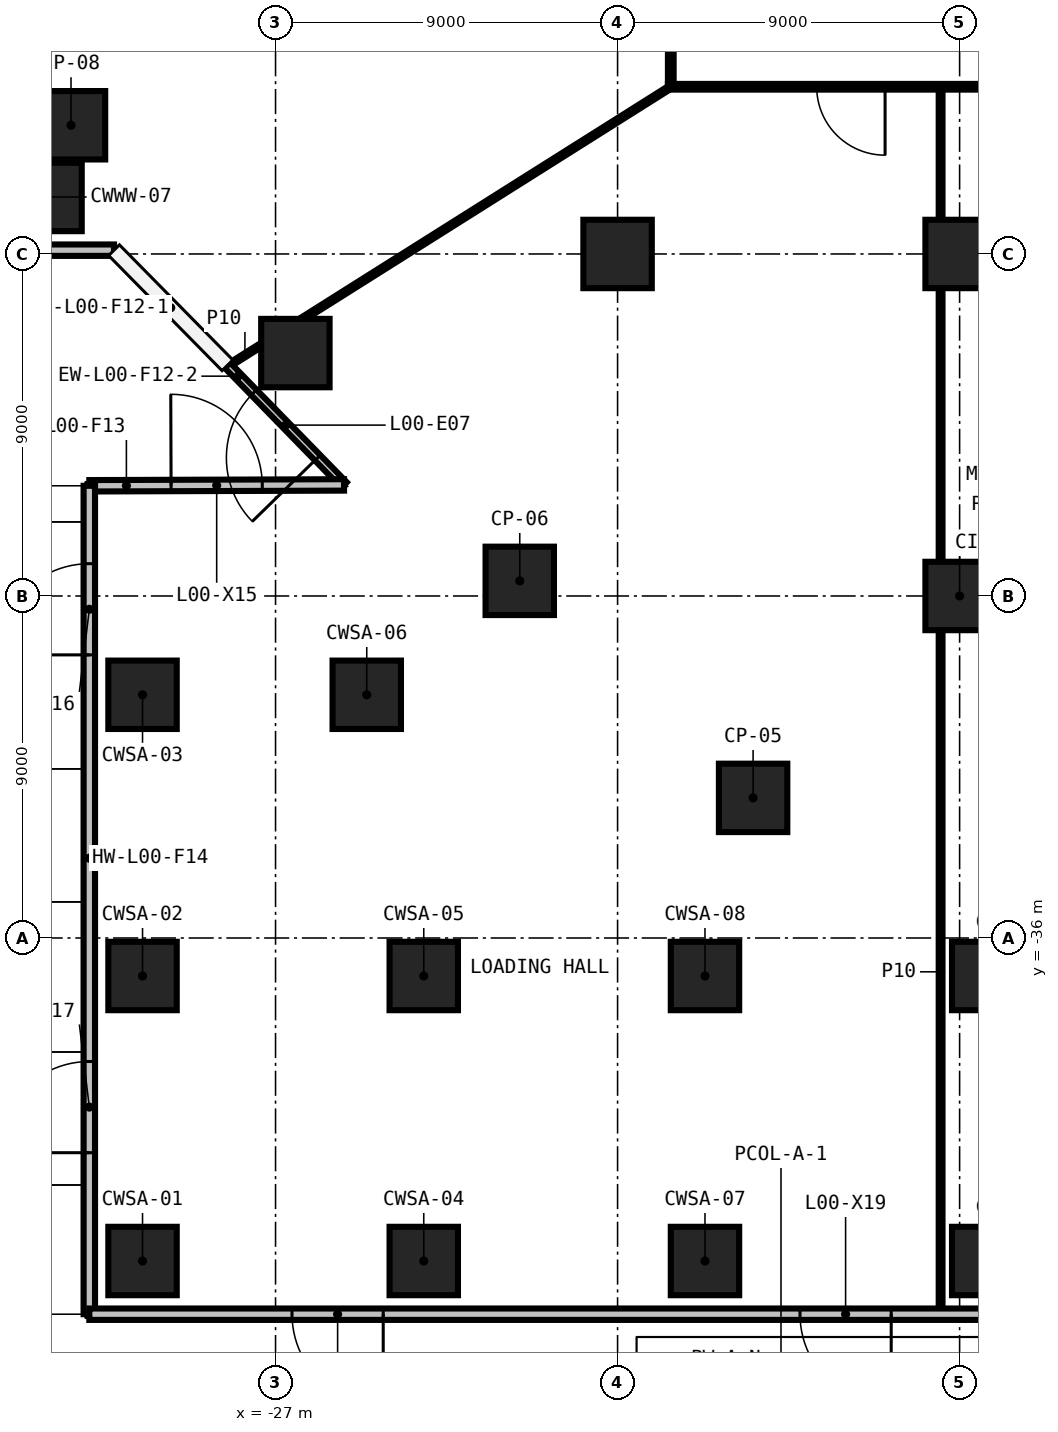
"""IFC4 building model, lengths in metres.
Left out: names, types, materials, properties, quantities, classifications, styles, units other than length and angle.
Written with IfcOpenShell. Run it as: python <this file> out.ifc"""

import sys

from ifc_helpers import new_model, si_unit, direction, frame, frame_2d, origin, origin_2d, place, context, subcontext, project, spatial, rectangle, extrude, element, fill, save


model = new_model("IFC4")
c1 = context("Model", 3, precision=1e-05, world=origin(), true_north=direction((0.0, 1.0)))
c2 = subcontext(c1, "Body", "Model", "MODEL_VIEW")
j1 = project(units=[si_unit("LENGTHUNIT", "METRE"), si_unit("PLANEANGLEUNIT", "RADIAN")], contexts=[c1])
p1 = place(None, origin())
s1 = spatial("IfcSite", under=j1, at=p1, CompositionType="ELEMENT")
p2 = place(p1, origin())
s2 = spatial("IfcBuilding", under=s1, at=p2, CompositionType="ELEMENT")
p3 = place(p2, origin())
s3 = spatial("IfcBuildingStorey", under=s2, at=p3, CompositionType="ELEMENT", Elevation=0.0)
for number, where, z_axis, x_axis in (
    (1, (-14.434, -32.313, 0.0), (0.0, 0.0, 1.0), (1.0, 0.0, 0.0)),
    (2, (-20.574, -26.602, 0.0), (0.0, 0.0, 1.0), (1.0, 0.0, 0.0)),
    (3, (-26.478, -20.608, 0.0), (0.0, 0.0, 1.0), (1.0, 0.0, 0.0)),
    (4, (-32.382, -14.613, 0.0), (0.0, 0.0, 1.0), (1.0, 0.0, 0.0)),
    (5, (-18.0, -18.0, 0.0), (0.0, 0.0, 1.0), (1.0, 0.0, 0.0)),
    (6, (-9.0, -27.0, 0.0), (0.0, 0.0, 1.0), (1.0, 0.0, 0.0)),
    (7, (-9.0, -18.0, 0.0), (0.0, 0.0, 1.0), (1.0, 0.0, 0.0)),
):
    element("IfcColumn", number, at=place(p3, frame(where, z_axis=z_axis, x_axis=x_axis)), inside=s3, PredefinedType="COLUMN", context=c2, shape_type="SweptSolid", body=[
        extrude(rectangle(XDim=1.8, YDim=1.8, at=origin_2d()), origin(), (0.0, 0.0, 1.0), 8.55),
    ])
p4 = place(p3, frame((-33.0, -16.5, 0.0), z_axis=(0.0, 0.0, 1.0), x_axis=(1.0, 0.0, 0.0)))
e8 = element("IfcColumn", 8, at=p4, inside=s3, PredefinedType="COLUMN", context=c2, shape_type="SweptSolid", body=[
    extrude(rectangle(XDim=1.8, YDim=1.8, at=origin_2d()), origin(), (0.0, 0.0, 1.0), 8.7),
])
for number, where, z_axis, x_axis in (
    (9, (-30.5, -44.5, 0.0), (0.0, 0.0, 1.0), (1.0, 0.0, 0.0)),
    (10, (-30.5, -37.0, 0.0), (0.0, 0.0, 1.0), (1.0, 0.0, 0.0)),
    (11, (-30.5, -29.6, 0.0), (0.0, 0.0, 1.0), (1.0, 0.0, 0.0)),
    (12, (-23.1, -44.5, 0.0), (0.0, 0.0, 1.0), (1.0, 0.0, 0.0)),
    (13, (-23.1, -37.0, 0.0), (0.0, 0.0, 1.0), (1.0, 0.0, 0.0)),
    (14, (-24.6, -29.6, 0.0), (0.0, 0.0, 1.0), (1.0, 0.0, 0.0)),
    (15, (-15.7, -44.5, 0.0), (0.0, 0.0, 1.0), (1.0, 0.0, 0.0)),
    (16, (-15.7, -37.0, 0.0), (0.0, 0.0, 1.0), (1.0, 0.0, 0.0)),
    (17, (-8.3, -44.5, 0.0), (0.0, 0.0, 1.0), (1.0, 0.0, 0.0)),
    (18, (-8.3, -37.0, 0.0), (0.0, 0.0, 1.0), (1.0, 0.0, 0.0)),
):
    element("IfcColumn", number, at=place(p3, frame(where, z_axis=z_axis, x_axis=x_axis)), inside=s3, PredefinedType="COLUMN", context=c2, shape_type="SweptSolid", body=[
        extrude(rectangle(XDim=1.8, YDim=1.8, at=origin_2d()), origin(), (0.0, 0.0, 1.0), 8.55),
    ])
p5 = place(p3, frame((16.675, -13.6, 0.0), z_axis=(0.0, 0.0, 1.0), x_axis=(-1.0, 0.0, 0.0)))
e19 = element("IfcWall", 19, at=p5, inside=s3, PredefinedType="PARTITIONING", context=c2, shape_type="SweptSolid", body=[
    extrude(rectangle(XDim=33.35, YDim=0.15, at=frame_2d((16.675, 0.0))), origin(), (0.0, 0.0, 1.0), 8.55),
])
p6 = place(p5, frame((27.636, 0.0, 0.0)))
e20 = element("IfcOpeningElement", 20, at=p6, cuts=e19, PredefinedType="OPENING", context=c2, shape_type="SweptSolid", body=[
    extrude(rectangle(XDim=1.8, YDim=2.4, at=frame_2d((0.9, 1.2))), frame((0.0, 0.085, 0.0), z_axis=(0.0, -1.0, 0.0), x_axis=(1.0, 0.0, 0.0)), (0.0, 0.0, 1.0), 0.17),
])
p7 = place(p5, frame((23.492, 0.0, 0.0)))
e21 = element("IfcOpeningElement", 21, at=p7, cuts=e19, PredefinedType="OPENING", context=c2, shape_type="SweptSolid", body=[
    extrude(rectangle(XDim=1.2, YDim=2.1, at=frame_2d((0.6, 1.05))), frame((0.0, 0.085, 0.0), z_axis=(0.0, -1.0, 0.0), x_axis=(1.0, 0.0, 0.0)), (0.0, 0.0, 1.0), 0.17),
])
p8 = place(p5, frame((17.167, 0.0, 0.0)))
e22 = element("IfcOpeningElement", 22, at=p8, cuts=e19, PredefinedType="OPENING", context=c2, shape_type="SweptSolid", body=[
    extrude(rectangle(XDim=1.2, YDim=2.1, at=frame_2d((0.6, 1.05))), frame((0.0, 0.085, 0.0), z_axis=(0.0, -1.0, 0.0), x_axis=(1.0, 0.0, 0.0)), (0.0, 0.0, 1.0), 0.17),
])
p9 = place(p5, frame((1.764, 0.0, 0.0)))
e23 = element("IfcOpeningElement", 23, at=p9, cuts=e19, PredefinedType="OPENING", context=c2, shape_type="SweptSolid", body=[
    extrude(rectangle(XDim=1.2, YDim=2.1, at=frame_2d((0.6, 1.05))), frame((0.0, 0.085, 0.0), z_axis=(0.0, -1.0, 0.0), x_axis=(1.0, 0.0, 0.0)), (0.0, 0.0, 1.0), 0.17),
])
p10 = place(p5, frame((10.3, 0.0, 0.0)))
e24 = element("IfcOpeningElement", 24, at=p10, cuts=e19, PredefinedType="OPENING", context=c2, shape_type="SweptSolid", body=[
    extrude(rectangle(XDim=1.6, YDim=2.1, at=frame_2d((0.8, 1.05))), frame((0.0, 0.085, 0.0), z_axis=(0.0, -1.0, 0.0), x_axis=(1.0, 0.0, 0.0)), (0.0, 0.0, 1.0), 0.17),
])
p11 = place(p3, frame((-28.233, -20.934, 0.0), z_axis=(0.0, 0.0, 1.0), x_axis=(0.845930337859, 0.533293412195, 0.0)))
e25 = element("IfcWall", 25, at=p11, inside=s3, PredefinedType="PARTITIONING", context=c2, shape_type="SweptSolid", body=[
    extrude(rectangle(XDim=1.011, YDim=0.1, at=frame_2d((0.506, 0.0))), origin(), (0.0, 0.0, 1.0), 8.55),
])
p12 = place(p3, frame((-26.289, -19.708, 0.0), z_axis=(0.0, 0.0, 1.0), x_axis=(0.845914104745, 0.53331916091, 0.0)))
e26 = element("IfcWall", 26, at=p12, inside=s3, PredefinedType="PARTITIONING", context=c2, shape_type="SweptSolid", body=[
    extrude(rectangle(XDim=11.454, YDim=0.1, at=frame_2d((5.727, 0.0))), origin(), (0.0, 0.0, 1.0), 8.55),
])
p13 = place(p3, frame((-9.5, -45.88, 0.0), z_axis=(0.0, 0.0, 1.0), x_axis=(0.0, 1.0, 0.0)))
e27 = element("IfcWall", 27, at=p13, inside=s3, PredefinedType="PARTITIONING", context=c2, shape_type="SweptSolid", body=[
    extrude(rectangle(XDim=17.98, YDim=0.1, at=frame_2d((8.99, 0.0))), origin(), (0.0, 0.0, 1.0), 8.55),
])
p14 = place(p3, frame((-9.5, -26.1, 0.0), z_axis=(0.0, 0.0, 1.0), x_axis=(0.0, 1.0, 0.0)))
e28 = element("IfcWall", 28, at=p14, inside=s3, PredefinedType="PARTITIONING", context=c2, shape_type="SweptSolid", body=[
    extrude(rectangle(XDim=7.2, YDim=0.1, at=frame_2d((3.6, 0.0))), origin(), (0.0, 0.0, 1.0), 8.55),
])
p15 = place(p3, frame((-9.5, -17.1, 0.0), z_axis=(0.0, 0.0, 1.0), x_axis=(0.0, 1.0, 0.0)))
e29 = element("IfcWall", 29, at=p15, inside=s3, PredefinedType="PARTITIONING", context=c2, shape_type="SweptSolid", body=[
    extrude(rectangle(XDim=3.425, YDim=0.1, at=frame_2d((1.712, 0.0))), origin(), (0.0, 0.0, 1.0), 8.55),
])
p16 = place(p3, frame((-16.6, -13.525, 0.0), z_axis=(0.0, 0.0, 1.0), x_axis=(0.0, 1.0, 0.0)))
e30 = element("IfcWall", 30, at=p16, inside=s3, PredefinedType="PARTITIONING", context=c2, shape_type="SweptSolid", body=[
    extrude(rectangle(XDim=27.05, YDim=0.15, at=frame_2d((13.525, 0.0))), origin(), (0.0, 0.0, 1.0), 8.55),
])
p17 = place(p16, frame((17.467, 0.0, 0.0)))
e31 = element("IfcOpeningElement", 31, at=p17, cuts=e30, PredefinedType="OPENING", context=c2, shape_type="SweptSolid", body=[
    extrude(rectangle(XDim=1.2, YDim=2.1, at=frame_2d((0.6, 1.05))), frame((0.0, 0.085, 0.0), z_axis=(0.0, -1.0, 0.0), x_axis=(1.0, 0.0, 0.0)), (0.0, 0.0, 1.0), 0.17),
])
p18 = place(p3, frame((-31.25, -17.9, 0.0), z_axis=(0.0, 0.0, 1.0), x_axis=(-1.0, 0.0, 0.0)))
e32 = element("IfcWall", 32, at=p18, inside=s3, PredefinedType="SOLIDWALL", context=c2, shape_type="SweptSolid", body=[
    extrude(rectangle(XDim=26.65, YDim=0.3, at=frame_2d((13.325, 0.0))), origin(), (0.0, 0.0, 1.0), 8.55),
])
p19 = place(p18, frame((18.788, 0.0, 0.0)))
e33 = element("IfcOpeningElement", 33, at=p19, cuts=e32, PredefinedType="OPENING", context=c2, shape_type="SweptSolid", body=[
    extrude(rectangle(XDim=2.4, YDim=2.4, at=frame_2d((1.2, 1.2))), frame((0.0, 0.16, 0.0), z_axis=(0.0, -1.0, 0.0), x_axis=(1.0, 0.0, 0.0)), (0.0, 0.0, 1.0), 0.32),
])
p20 = place(p18, frame((3.762, 0.0, 0.0)))
e34 = element("IfcOpeningElement", 34, at=p20, cuts=e32, PredefinedType="OPENING", context=c2, shape_type="SweptSolid", body=[
    extrude(rectangle(XDim=2.4, YDim=2.4, at=frame_2d((1.2, 1.2))), frame((0.0, 0.16, 0.0), z_axis=(0.0, -1.0, 0.0), x_axis=(1.0, 0.0, 0.0)), (0.0, 0.0, 1.0), 0.32),
])
p21 = place(p3, frame((-25.198, -24.077, 0.0), z_axis=(0.0, 0.0, 1.0), x_axis=(-0.698022531425, 0.716075796005, 0.0)))
e35 = element("IfcWall", 35, at=p21, inside=s3, PredefinedType="SOLIDWALL", context=c2, shape_type="SweptSolid", body=[
    extrude(rectangle(XDim=4.395, YDim=0.2, at=frame_2d((2.198, 0.0))), origin(), (0.0, 0.0, 1.0), 8.55),
])
p22 = place(p21, frame((0.998, 0.0, 0.0)))
e36 = element("IfcOpeningElement", 36, at=p22, cuts=e35, PredefinedType="OPENING", context=c2, shape_type="SweptSolid", body=[
    extrude(rectangle(XDim=2.4, YDim=2.4, at=frame_2d((1.2, 1.2))), frame((0.0, 0.11, 0.0), z_axis=(0.0, -1.0, 0.0), x_axis=(1.0, 0.0, 0.0)), (0.0, 0.0, 1.0), 0.22),
])
p23 = place(p3, frame((-31.9, -24.1, 0.0), z_axis=(0.0, 0.0, 1.0), x_axis=(0.999994137621, 0.003424138458, 0.0)))
e37 = element("IfcWall", 37, at=p23, inside=s3, PredefinedType="SOLIDWALL", context=c2, shape_type="SweptSolid", body=[
    extrude(rectangle(XDim=6.702, YDim=0.3, at=frame_2d((3.351, 0.0))), origin(), (0.0, 0.0, 1.0), 8.55),
])
p24 = place(p23, frame((2.151, 0.0, 0.0)))
e38 = element("IfcOpeningElement", 38, at=p24, cuts=e37, PredefinedType="OPENING", context=c2, shape_type="SweptSolid", body=[
    extrude(rectangle(XDim=2.4, YDim=2.4, at=frame_2d((1.2, 1.2))), frame((0.0, 0.16, 0.0), z_axis=(0.0, -1.0, 0.0), x_axis=(1.0, 0.0, 0.0)), (0.0, 0.0, 1.0), 0.32),
])
p25 = place(p3, frame((-31.9, -45.9, 0.0), z_axis=(0.0, 0.0, 1.0), x_axis=(0.0, 1.0, 0.0)))
e39 = element("IfcWall", 39, at=p25, inside=s3, PredefinedType="SOLIDWALL", context=c2, shape_type="SweptSolid", body=[
    extrude(rectangle(XDim=21.8, YDim=0.3, at=frame_2d((10.9, 0.0))), origin(), (0.0, 0.0, 1.0), 8.55),
])
p26 = place(p25, frame((17.35, 0.0, 0.0)))
e40 = element("IfcOpeningElement", 40, at=p26, cuts=e39, PredefinedType="OPENING", context=c2, shape_type="SweptSolid", body=[
    extrude(rectangle(XDim=2.4, YDim=2.4, at=frame_2d((1.2, 1.2))), frame((0.0, 0.16, 0.0), z_axis=(0.0, -1.0, 0.0), x_axis=(1.0, 0.0, 0.0)), (0.0, 0.0, 1.0), 0.32),
])
p27 = place(p25, frame((4.25, 0.0, 0.0)))
e41 = element("IfcOpeningElement", 41, at=p27, cuts=e39, PredefinedType="OPENING", context=c2, shape_type="SweptSolid", body=[
    extrude(rectangle(XDim=2.4, YDim=2.4, at=frame_2d((1.2, 1.2))), frame((0.0, 0.16, 0.0), z_axis=(0.0, -1.0, 0.0), x_axis=(1.0, 0.0, 0.0)), (0.0, 0.0, 1.0), 0.32),
])
p28 = place(p3, frame((7.9, -45.9, 0.0), z_axis=(0.0, 0.0, 1.0), x_axis=(-1.0, 0.0, 0.0)))
e42 = element("IfcWall", 42, at=p28, inside=s3, PredefinedType="SOLIDWALL", context=c2, shape_type="SweptSolid", body=[
    extrude(rectangle(XDim=39.8, YDim=0.3, at=frame_2d((19.9, 0.0))), origin(), (0.0, 0.0, 1.0), 8.55),
])
p29 = place(p28, frame((32.067, 0.0, 0.0)))
e43 = element("IfcOpeningElement", 43, at=p29, cuts=e42, PredefinedType="OPENING", context=c2, shape_type="SweptSolid", body=[
    extrude(rectangle(XDim=2.4, YDim=2.4, at=frame_2d((1.2, 1.2))), frame((0.0, 0.16, 0.0), z_axis=(0.0, -1.0, 0.0), x_axis=(1.0, 0.0, 0.0)), (0.0, 0.0, 1.0), 0.32),
])
p30 = place(p28, frame((18.7, 0.0, 0.0)))
e44 = element("IfcOpeningElement", 44, at=p30, cuts=e42, PredefinedType="OPENING", context=c2, shape_type="SweptSolid", body=[
    extrude(rectangle(XDim=2.4, YDim=2.4, at=frame_2d((1.2, 1.2))), frame((0.0, 0.16, 0.0), z_axis=(0.0, -1.0, 0.0), x_axis=(1.0, 0.0, 0.0)), (0.0, 0.0, 1.0), 0.32),
])
p31 = place(p28, frame((2.6, 0.0, 0.0)))
e45 = element("IfcOpeningElement", 45, at=p31, cuts=e42, PredefinedType="OPENING", context=c2, shape_type="SweptSolid", body=[
    extrude(rectangle(XDim=1.8, YDim=2.4, at=frame_2d((0.9, 1.2))), frame((0.0, 0.16, 0.0), z_axis=(0.0, -1.0, 0.0), x_axis=(1.0, 0.0, 0.0)), (0.0, 0.0, 1.0), 0.32),
])
p32 = place(p6, origin())
e46 = element("IfcDoor", 46, at=p32, inside=s3, OperationType="DOUBLE_DOOR_SINGLE_SWING", PredefinedType="DOOR", context=c2, shape_type="SweptSolid", body=[
    extrude(rectangle(XDim=1.8, YDim=2.4, at=frame_2d((0.9, 1.2))), frame((0.0, 0.025, 0.0), z_axis=(0.0, -1.0, 0.0), x_axis=(1.0, 0.0, 0.0)), (0.0, 0.0, 1.0), 0.05),
])
fill(e20, e46)
p33 = place(p22, origin())
e47 = element("IfcDoor", 47, at=p33, inside=s3, OperationType="SINGLE_SWING_LEFT", PredefinedType="DOOR", context=c2, shape_type="SweptSolid", body=[
    extrude(rectangle(XDim=2.4, YDim=2.4, at=frame_2d((1.2, 1.2))), frame((0.0, 0.025, 0.0), z_axis=(0.0, -1.0, 0.0), x_axis=(1.0, 0.0, 0.0)), (0.0, 0.0, 1.0), 0.05),
])
fill(e36, e47)
p34 = place(p24, origin())
e48 = element("IfcDoor", 48, at=p34, inside=s3, OperationType="SINGLE_SWING_LEFT", PredefinedType="DOOR", context=c2, shape_type="SweptSolid", body=[
    extrude(rectangle(XDim=2.4, YDim=2.4, at=frame_2d((1.2, 1.2))), frame((0.0, 0.025, 0.0), z_axis=(0.0, -1.0, 0.0), x_axis=(1.0, 0.0, 0.0)), (0.0, 0.0, 1.0), 0.05),
])
fill(e38, e48)
p35 = place(p26, origin())
e49 = element("IfcDoor", 49, at=p35, inside=s3, OperationType="SINGLE_SWING_LEFT", PredefinedType="DOOR", context=c2, shape_type="SweptSolid", body=[
    extrude(rectangle(XDim=2.4, YDim=2.4, at=frame_2d((1.2, 1.2))), frame((0.0, 0.025, 0.0), z_axis=(0.0, -1.0, 0.0), x_axis=(1.0, 0.0, 0.0)), (0.0, 0.0, 1.0), 0.05),
])
fill(e40, e49)
p36 = place(p27, origin())
e50 = element("IfcDoor", 50, at=p36, inside=s3, OperationType="SINGLE_SWING_LEFT", PredefinedType="DOOR", context=c2, shape_type="SweptSolid", body=[
    extrude(rectangle(XDim=2.4, YDim=2.4, at=frame_2d((1.2, 1.2))), frame((0.0, 0.025, 0.0), z_axis=(0.0, -1.0, 0.0), x_axis=(1.0, 0.0, 0.0)), (0.0, 0.0, 1.0), 0.05),
])
fill(e41, e50)
p37 = place(p29, origin())
e51 = element("IfcDoor", 51, at=p37, inside=s3, OperationType="SINGLE_SWING_LEFT", PredefinedType="DOOR", context=c2, shape_type="SweptSolid", body=[
    extrude(rectangle(XDim=2.4, YDim=2.4, at=frame_2d((1.2, 1.2))), frame((0.0, 0.025, 0.0), z_axis=(0.0, -1.0, 0.0), x_axis=(1.0, 0.0, 0.0)), (0.0, 0.0, 1.0), 0.05),
])
fill(e43, e51)
p38 = place(p30, origin())
e52 = element("IfcDoor", 52, at=p38, inside=s3, OperationType="SINGLE_SWING_LEFT", PredefinedType="DOOR", context=c2, shape_type="SweptSolid", body=[
    extrude(rectangle(XDim=2.4, YDim=2.4, at=frame_2d((1.2, 1.2))), frame((0.0, 0.025, 0.0), z_axis=(0.0, -1.0, 0.0), x_axis=(1.0, 0.0, 0.0)), (0.0, 0.0, 1.0), 0.05),
])
fill(e44, e52)
save(model, sys.argv[1])
